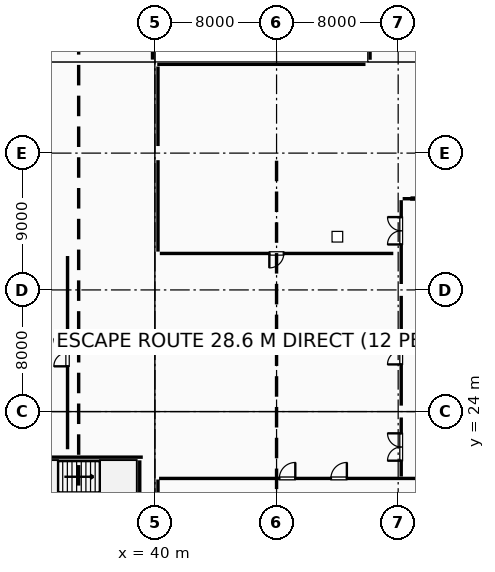
"""IFC4 building model, lengths in metres.
Left out: names, types, materials, properties, quantities, classifications, styles, units other than length and angle.
Written with IfcOpenShell. Run it as: python <this file> out.ifc"""

import sys

from ifc_helpers import new_model, si_unit, direction, frame, frame_2d, origin, origin_2d, place, context, subcontext, project, spatial, rectangle, extrude, element, fill, save


model = new_model("IFC4")
c1 = context("Model", 3, precision=1e-05, world=origin(), true_north=direction((0.0, 1.0)))
c2 = subcontext(c1, "Body", "Model", "MODEL_VIEW")
j1 = project(units=[si_unit("LENGTHUNIT", "METRE"), si_unit("PLANEANGLEUNIT", "RADIAN")], contexts=[c1])
p1 = place(None, origin())
s1 = spatial("IfcSite", under=j1, at=p1, CompositionType="ELEMENT")
p2 = place(p1, origin())
s2 = spatial("IfcBuilding", under=s1, at=p2, CompositionType="ELEMENT")
p3 = place(p2, origin())
s3 = spatial("IfcBuildingStorey", under=s2, at=p3, CompositionType="ELEMENT", Elevation=0.0)
for number, where, z_axis, x_axis in (
    (1, (40.0, 24.0, 0.0), (0.0, 0.0, 1.0), (1.0, 0.0, 0.0)),
    (2, (40.0, 32.0, 0.0), (0.0, 0.0, 1.0), (1.0, 0.0, 0.0)),
    (3, (40.0, 41.0, 0.0), (0.0, 0.0, 1.0), (1.0, 0.0, 0.0)),
):
    element("IfcColumn", number, at=place(p3, frame(where, z_axis=z_axis, x_axis=x_axis)), inside=s3, PredefinedType="COLUMN", context=c2, shape_type="SweptSolid", body=[
        extrude(rectangle(XDim=0.9, YDim=0.9, at=origin_2d()), origin(), (0.0, 0.0, 1.0), 5.4),
    ])
for number, where, z_axis, x_axis in (
    (4, (48.0, 41.0, 0.0), (0.0, 0.0, 1.0), (1.0, 0.0, 0.0)),
    (5, (56.0, 24.0, 0.0), (0.0, 0.0, 1.0), (1.0, 0.0, 0.0)),
    (6, (56.0, 32.0, 0.0), (0.0, 0.0, 1.0), (1.0, 0.0, 0.0)),
    (7, (56.0, 41.0, 0.0), (0.0, 0.0, 1.0), (1.0, 0.0, 0.0)),
):
    element("IfcColumn", number, at=place(p3, frame(where, z_axis=z_axis, x_axis=x_axis)), inside=s3, PredefinedType="COLUMN", context=c2, shape_type="SweptSolid", body=[
        extrude(rectangle(XDim=0.75, YDim=0.75, at=origin_2d()), origin(), (0.0, 0.0, 1.0), 5.4),
    ])
p4 = place(p3, frame((39.84, 48.017, 0.0), z_axis=(0.0, 0.0, 1.0), x_axis=(0.0, -1.0, 0.0)))
e8 = element("IfcWall", 8, at=p4, inside=s3, PredefinedType="STANDARD", context=c2, shape_type="SweptSolid", body=[
    extrude(rectangle(XDim=0.867, YDim=0.28, at=frame_2d((0.434, 0.0))), origin(), (0.0, 0.0, 1.0), 4.355),
])
p5 = place(p3, frame((40.15, 46.84, 0.0), z_axis=(0.0, 0.0, 1.0), x_axis=(1.0, 0.0, 0.0)))
e9 = element("IfcWall", 9, at=p5, inside=s3, PredefinedType="STANDARD", context=c2, shape_type="SweptSolid", body=[
    extrude(rectangle(XDim=13.7, YDim=0.28, at=frame_2d((6.85, 0.0))), origin(), (0.0, 0.0, 1.0), 5.12),
])
p6 = place(p5, frame((5.65, 0.0, 0.95)))
e10 = element("IfcOpeningElement", 10, at=p6, cuts=e9, PredefinedType="OPENING", context=c2, shape_type="SweptSolid", body=[
    extrude(rectangle(XDim=2.4, YDim=2.1, at=frame_2d((1.2, 1.05))), frame((0.0, 0.15, 0.0), z_axis=(0.0, -1.0, 0.0), x_axis=(1.0, 0.0, 0.0)), (0.0, 0.0, 1.0), 0.3),
])
p7 = place(p3, frame((54.15, 47.14, 0.0), z_axis=(0.0, 0.0, 1.0), x_axis=(0.0, 1.0, 0.0)))
e11 = element("IfcWall", 11, at=p7, inside=s3, PredefinedType="ELEMENTEDWALL", context=c2, shape_type="SweptSolid", body=[
    extrude(rectangle(XDim=1.243, YDim=0.26, at=frame_2d((0.622, 0.0))), origin(), (0.0, 0.0, 1.0), 5.12),
])
p8 = place(p3, frame((39.2, 21.0, 0.0), z_axis=(0.0, 0.0, 1.0), x_axis=(-1.0, 0.0, 0.0)))
e12 = element("IfcWall", 12, at=p8, inside=s3, PredefinedType="SHEAR", context=c2, shape_type="SweptSolid", body=[
    extrude(rectangle(XDim=8.896, YDim=0.4, at=frame_2d((4.448, 0.0))), origin(), (0.0, 0.0, 1.0), 5.12),
])
p9 = place(p3, frame((39.0, 12.41, 0.0), z_axis=(0.0, 0.0, 1.0), x_axis=(0.0, 1.0, 0.0)))
e13 = element("IfcWall", 13, at=p9, inside=s3, PredefinedType="SHEAR", context=c2, shape_type="SweptSolid", body=[
    extrude(rectangle(XDim=8.38, YDim=0.4, at=frame_2d((4.19, 0.0))), origin(), (0.0, 0.0, 1.0), 5.12),
])
p10 = place(p3, frame((40.27, 19.6, 0.0), z_axis=(0.0, 0.0, 1.0), x_axis=(1.0, 0.0, 0.0)))
e14 = element("IfcWall", 14, at=p10, inside=s3, PredefinedType="PARTITIONING", context=c2, shape_type="SweptSolid", body=[
    extrude(rectangle(XDim=23.66, YDim=0.1, at=frame_2d((11.83, 0.0))), origin(), (0.0, 0.0, 1.0), 4.3),
])
p11 = place(p10, frame((11.305, 0.0, 0.0)))
e15 = element("IfcOpeningElement", 15, at=p11, cuts=e14, PredefinedType="OPENING", context=c2, shape_type="SweptSolid", body=[
    extrude(rectangle(XDim=1.05, YDim=2.15, at=frame_2d((0.525, 1.075))), frame((0.0, 0.06, 0.0), z_axis=(0.0, -1.0, 0.0), x_axis=(1.0, 0.0, 0.0)), (0.0, 0.0, 1.0), 0.12),
])
p12 = place(p10, frame((7.913, 0.0, 0.0)))
e16 = element("IfcOpeningElement", 16, at=p12, cuts=e14, PredefinedType="OPENING", context=c2, shape_type="SweptSolid", body=[
    extrude(rectangle(XDim=1.05, YDim=2.15, at=frame_2d((0.525, 1.075))), frame((0.0, 0.06, 0.0), z_axis=(0.0, -1.0, 0.0), x_axis=(1.0, 0.0, 0.0)), (0.0, 0.0, 1.0), 0.12),
])
p13 = place(p3, frame((40.2, 16.465, 0.0), z_axis=(0.0, 0.0, 1.0), x_axis=(0.0, 1.0, 0.0)))
e17 = element("IfcWall", 17, at=p13, inside=s3, PredefinedType="PARTITIONING", context=c2, shape_type="SweptSolid", body=[
    extrude(rectangle(XDim=3.065, YDim=0.1, at=frame_2d((1.532, 0.0))), origin(), (0.0, 0.0, 1.0), 4.65),
])
p14 = place(p3, frame((56.2, 19.725, 0.0), z_axis=(0.0, 0.0, 1.0), x_axis=(0.0, 1.0, 0.0)))
e18 = element("IfcWall", 18, at=p14, inside=s3, PredefinedType="PARTITIONING", context=c2, shape_type="SweptSolid", body=[
    extrude(rectangle(XDim=3.885, YDim=0.15, at=frame_2d((1.942, 0.0))), origin(), (0.0, 0.0, 1.0), 4.45),
])
p15 = place(p14, frame((1.042, 0.0, 0.0)))
e19 = element("IfcOpeningElement", 19, at=p15, cuts=e18, PredefinedType="OPENING", context=c2, shape_type="SweptSolid", body=[
    extrude(rectangle(XDim=1.8, YDim=2.15, at=frame_2d((0.9, 1.075))), frame((0.0, 0.085, 0.0), z_axis=(0.0, -1.0, 0.0), x_axis=(1.0, 0.0, 0.0)), (0.0, 0.0, 1.0), 0.17),
])
p16 = place(p3, frame((56.2, 24.39, 0.0), z_axis=(0.0, 0.0, 1.0), x_axis=(0.0, 1.0, 0.0)))
e20 = element("IfcWall", 20, at=p16, inside=s3, PredefinedType="PARTITIONING", context=c2, shape_type="SweptSolid", body=[
    extrude(rectangle(XDim=7.22, YDim=0.15, at=frame_2d((3.61, 0.0))), origin(), (0.0, 0.0, 1.0), 4.65),
])
p17 = place(p16, frame((2.71, 0.0, 0.0)))
e21 = element("IfcOpeningElement", 21, at=p17, cuts=e20, PredefinedType="OPENING", context=c2, shape_type="SweptSolid", body=[
    extrude(rectangle(XDim=1.8, YDim=2.15, at=frame_2d((0.9, 1.075))), frame((0.0, 0.085, 0.0), z_axis=(0.0, -1.0, 0.0), x_axis=(1.0, 0.0, 0.0)), (0.0, 0.0, 1.0), 0.17),
])
p18 = place(p3, frame((56.2, 32.39, 0.0), z_axis=(0.0, 0.0, 1.0), x_axis=(0.0, 1.0, 0.0)))
e22 = element("IfcWall", 22, at=p18, inside=s3, PredefinedType="PARTITIONING", context=c2, shape_type="SweptSolid", body=[
    extrude(rectangle(XDim=5.515, YDim=0.15, at=frame_2d((2.758, 0.0))), origin(), (0.0, 0.0, 1.0), 4.5),
])
p19 = place(p18, frame((2.601, 0.0, 0.0)))
e23 = element("IfcOpeningElement", 23, at=p19, cuts=e22, PredefinedType="OPENING", context=c2, shape_type="SweptSolid", body=[
    extrude(rectangle(XDim=1.8, YDim=2.15, at=frame_2d((0.9, 1.075))), frame((0.0, 0.085, 0.0), z_axis=(0.0, -1.0, 0.0), x_axis=(1.0, 0.0, 0.0)), (0.0, 0.0, 1.0), 0.17),
])
p20 = place(p3, frame((56.295, 38.0, 0.0), z_axis=(0.0, 0.0, 1.0), x_axis=(1.0, 0.0, 0.0)))
e24 = element("IfcWall", 24, at=p20, inside=s3, PredefinedType="PARTITIONING", context=c2, shape_type="SweptSolid", body=[
    extrude(rectangle(XDim=2.16, YDim=0.15, at=frame_2d((1.08, 0.0))), origin(), (0.0, 0.0, 1.0), 5.11),
])
p21 = place(p20, frame((0.532, 0.0, 0.0)))
e25 = element("IfcOpeningElement", 25, at=p21, cuts=e24, PredefinedType="OPENING", context=c2, shape_type="SweptSolid", body=[
    extrude(rectangle(XDim=1.4, YDim=2.15, at=frame_2d((0.7, 1.075))), frame((0.0, 0.085, 0.0), z_axis=(0.0, -1.0, 0.0), x_axis=(1.0, 0.0, 0.0)), (0.0, 0.0, 1.0), 0.17),
])
p22 = place(p3, frame((55.68, 34.4, 0.0), z_axis=(0.0, 0.0, 1.0), x_axis=(-1.0, 0.0, 0.0)))
e26 = element("IfcWall", 26, at=p22, inside=s3, PredefinedType="PARTITIONING", context=c2, shape_type="SweptSolid", body=[
    extrude(rectangle(XDim=15.36, YDim=0.2, at=frame_2d((7.68, 0.0))), origin(), (0.0, 0.0, 1.0), 5.11),
])
p23 = place(p22, frame((7.205, 0.0, 0.0)))
e27 = element("IfcOpeningElement", 27, at=p23, cuts=e26, PredefinedType="OPENING", context=c2, shape_type="SweptSolid", body=[
    extrude(rectangle(XDim=0.95, YDim=2.15, at=frame_2d((0.475, 1.075))), frame((0.0, 0.11, 0.0), z_axis=(0.0, -1.0, 0.0), x_axis=(1.0, 0.0, 0.0)), (0.0, 0.0, 1.0), 0.22),
])
p24 = place(p3, frame((40.2, 34.52, 0.0), z_axis=(0.0, 0.0, 1.0), x_axis=(0.0, 1.0, 0.0)))
e28 = element("IfcWall", 28, at=p24, inside=s3, PredefinedType="PARTITIONING", context=c2, shape_type="SweptSolid", body=[
    extrude(rectangle(XDim=6.015, YDim=0.2, at=frame_2d((3.007, 0.0))), origin(), (0.0, 0.0, 1.0), 4.25),
])
p25 = place(p3, frame((40.2, 41.465, 0.0), z_axis=(0.0, 0.0, 1.0), x_axis=(0.0, 1.0, 0.0)))
e29 = element("IfcWall", 29, at=p25, inside=s3, PredefinedType="PARTITIONING", context=c2, shape_type="SweptSolid", body=[
    extrude(rectangle(XDim=5.231, YDim=0.2, at=frame_2d((2.615, 0.0))), origin(), (0.0, 0.0, 1.0), 4.35),
])
p26 = place(p3, frame((34.25, 21.52, 0.0), z_axis=(0.0, 0.0, 1.0), x_axis=(0.0, 1.0, 0.0)))
e30 = element("IfcWall", 30, at=p26, inside=s3, PredefinedType="PARTITIONING", context=c2, shape_type="SweptSolid", body=[
    extrude(rectangle(XDim=12.71, YDim=0.2, at=frame_2d((6.355, 0.0))), origin(), (0.0, 0.0, 1.0), 5.11),
])
p27 = place(p26, frame((5.455, 0.0, 0.0)))
e31 = element("IfcOpeningElement", 31, at=p27, cuts=e30, PredefinedType="OPENING", context=c2, shape_type="SweptSolid", body=[
    extrude(rectangle(XDim=1.8, YDim=2.15, at=frame_2d((0.9, 1.075))), frame((0.0, 0.11, 0.0), z_axis=(0.0, -1.0, 0.0), x_axis=(1.0, 0.0, 0.0)), (0.0, 0.0, 1.0), 0.22),
])
p28 = place(p6, origin())
e32 = element("IfcWindow", 32, at=p28, inside=s3, PartitioningType="SINGLE_PANEL", PredefinedType="SKYLIGHT", context=c2, shape_type="SweptSolid", body=[
    extrude(rectangle(XDim=2.4, YDim=2.1, at=frame_2d((1.2, 1.05))), frame((0.0, 0.03, 0.0), z_axis=(0.0, -1.0, 0.0), x_axis=(1.0, 0.0, 0.0)), (0.0, 0.0, 1.0), 0.06),
])
fill(e10, e32)
p29 = place(p11, origin())
e33 = element("IfcDoor", 33, at=p29, inside=s3, OperationType="SINGLE_SWING_RIGHT", PredefinedType="DOOR", context=c2, shape_type="SweptSolid", body=[
    extrude(rectangle(XDim=1.05, YDim=2.15, at=frame_2d((0.525, 1.075))), frame((0.0, 0.025, 0.0), z_axis=(0.0, -1.0, 0.0), x_axis=(1.0, 0.0, 0.0)), (0.0, 0.0, 1.0), 0.05),
])
fill(e15, e33)
p30 = place(p23, origin())
e34 = element("IfcDoor", 34, at=p30, inside=s3, OperationType="SINGLE_SWING_RIGHT", PredefinedType="DOOR", context=c2, shape_type="SweptSolid", body=[
    extrude(rectangle(XDim=0.95, YDim=2.15, at=frame_2d((0.475, 1.075))), frame((0.0, 0.025, 0.0), z_axis=(0.0, -1.0, 0.0), x_axis=(1.0, 0.0, 0.0)), (0.0, 0.0, 1.0), 0.05),
])
fill(e27, e34)
p31 = place(p12, origin())
e35 = element("IfcDoor", 35, at=p31, inside=s3, OperationType="SINGLE_SWING_RIGHT", PredefinedType="DOOR", context=c2, shape_type="SweptSolid", body=[
    extrude(rectangle(XDim=1.05, YDim=2.15, at=frame_2d((0.525, 1.075))), frame((0.0, 0.025, 0.0), z_axis=(0.0, -1.0, 0.0), x_axis=(1.0, 0.0, 0.0)), (0.0, 0.0, 1.0), 0.05),
])
fill(e16, e35)
p32 = place(p15, origin())
e36 = element("IfcDoor", 36, at=p32, inside=s3, OperationType="DOUBLE_DOOR_SINGLE_SWING", PredefinedType="DOOR", context=c2, shape_type="SweptSolid", body=[
    extrude(rectangle(XDim=1.8, YDim=2.15, at=frame_2d((0.9, 1.075))), frame((0.0, 0.025, 0.0), z_axis=(0.0, -1.0, 0.0), x_axis=(1.0, 0.0, 0.0)), (0.0, 0.0, 1.0), 0.05),
])
fill(e19, e36)
p33 = place(p17, origin())
e37 = element("IfcDoor", 37, at=p33, inside=s3, OperationType="DOUBLE_DOOR_SINGLE_SWING", PredefinedType="DOOR", context=c2, shape_type="SweptSolid", body=[
    extrude(rectangle(XDim=1.8, YDim=2.15, at=frame_2d((0.9, 1.075))), frame((0.0, 0.025, 0.0), z_axis=(0.0, -1.0, 0.0), x_axis=(1.0, 0.0, 0.0)), (0.0, 0.0, 1.0), 0.05),
])
fill(e21, e37)
p34 = place(p19, origin())
e38 = element("IfcDoor", 38, at=p34, inside=s3, OperationType="DOUBLE_DOOR_SINGLE_SWING", PredefinedType="DOOR", context=c2, shape_type="SweptSolid", body=[
    extrude(rectangle(XDim=1.8, YDim=2.15, at=frame_2d((0.9, 1.075))), frame((0.0, 0.025, 0.0), z_axis=(0.0, -1.0, 0.0), x_axis=(1.0, 0.0, 0.0)), (0.0, 0.0, 1.0), 0.05),
])
fill(e23, e38)
p35 = place(p21, origin())
e39 = element("IfcDoor", 39, at=p35, inside=s3, OperationType="SLIDING_TO_LEFT", PredefinedType="DOOR", context=c2, shape_type="SweptSolid", body=[
    extrude(rectangle(XDim=1.4, YDim=2.15, at=frame_2d((0.7, 1.075))), frame((0.0, 0.025, 0.0), z_axis=(0.0, -1.0, 0.0), x_axis=(1.0, 0.0, 0.0)), (0.0, 0.0, 1.0), 0.05),
])
fill(e25, e39)
p36 = place(p27, origin())
e40 = element("IfcDoor", 40, at=p36, inside=s3, OperationType="DOUBLE_DOOR_SINGLE_SWING", PredefinedType="DOOR", context=c2, shape_type="SweptSolid", body=[
    extrude(rectangle(XDim=1.8, YDim=2.15, at=frame_2d((0.9, 1.075))), frame((0.0, 0.025, 0.0), z_axis=(0.0, -1.0, 0.0), x_axis=(1.0, 0.0, 0.0)), (0.0, 0.0, 1.0), 0.05),
])
fill(e31, e40)
save(model, sys.argv[1])
